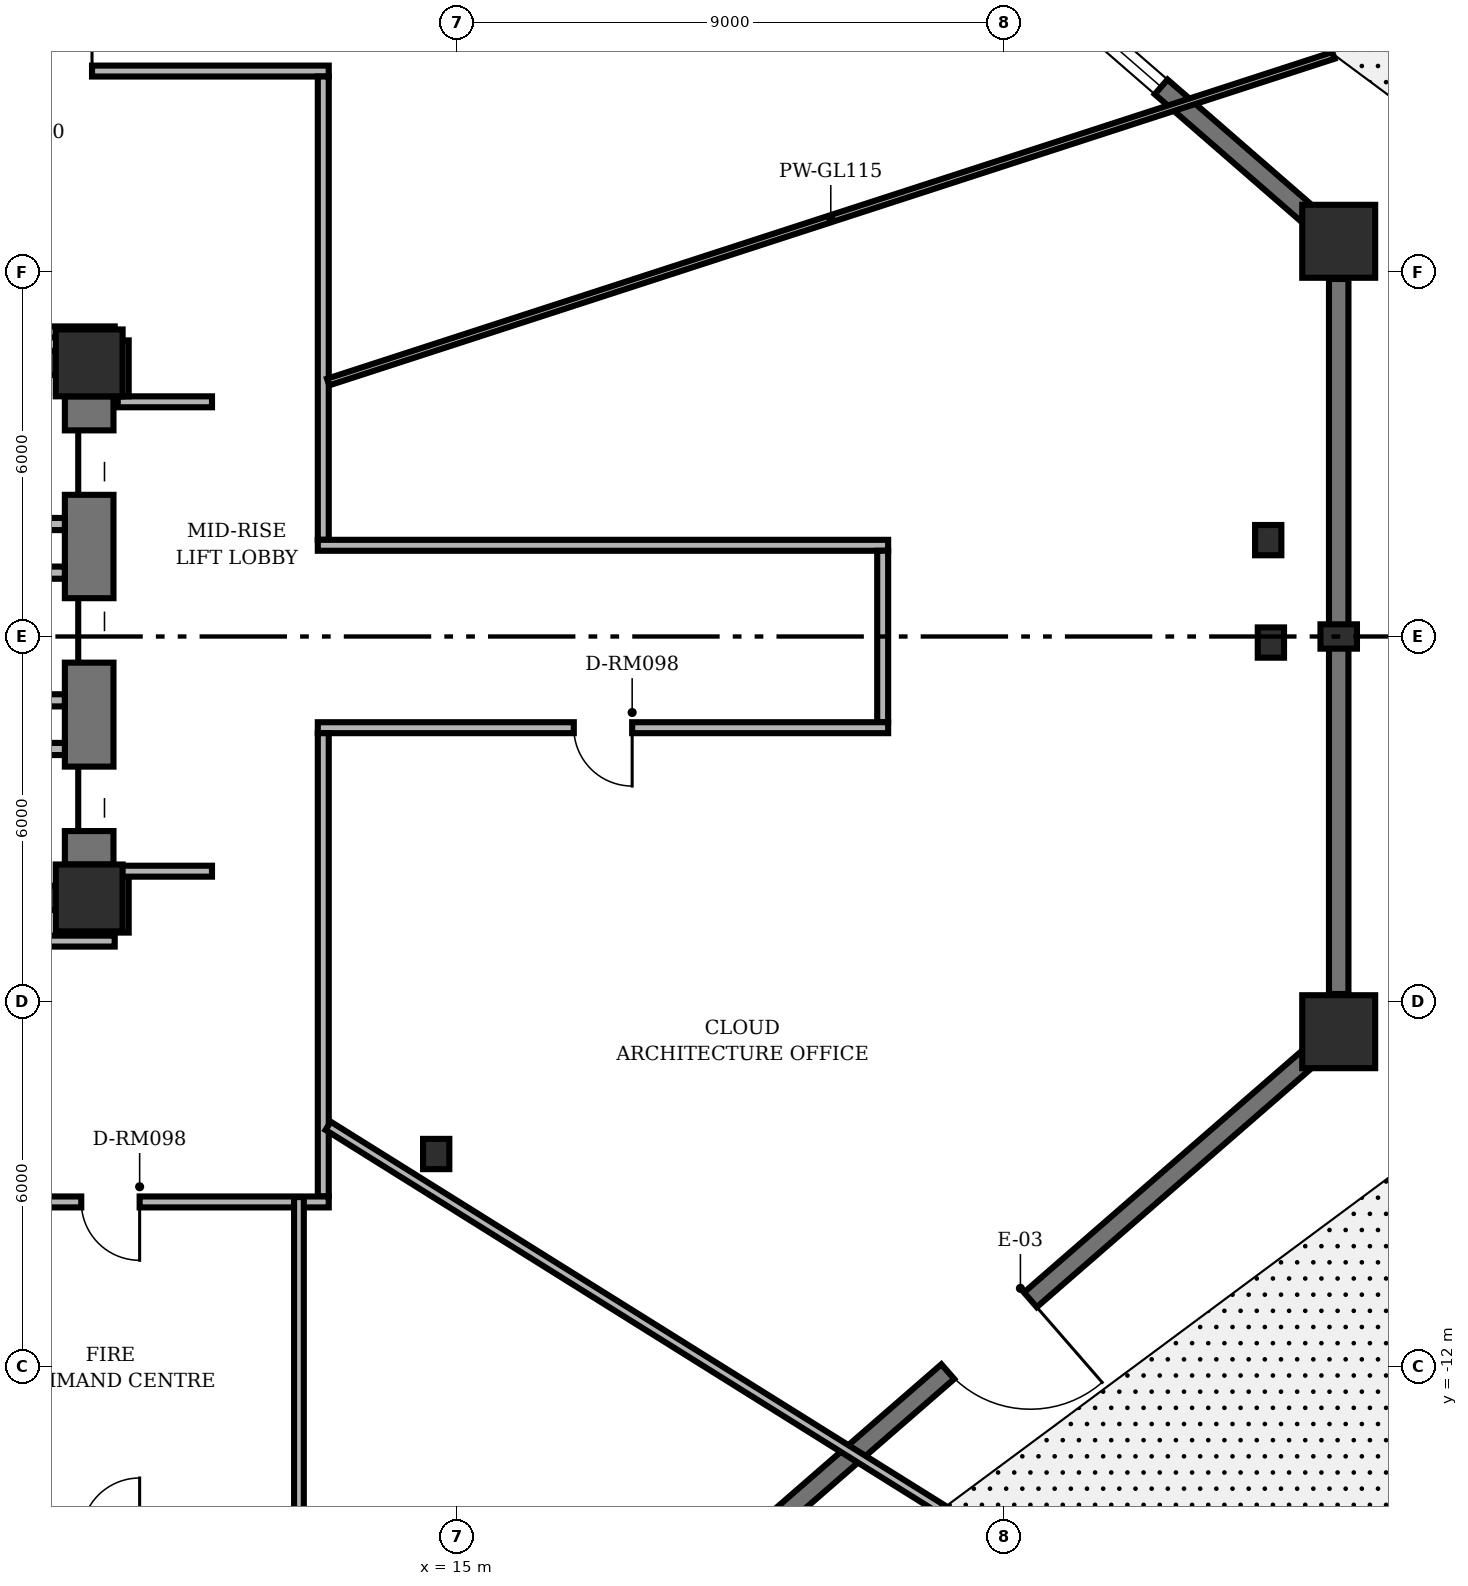
"""IFC4 building model, lengths in metres.
Left out: names, types, materials, properties, quantities, classifications, styles, units other than length and angle.
Written with IfcOpenShell. Run it as: python <this file> out.ifc"""

import sys

from ifc_helpers import new_model, si_unit, direction, frame, frame_2d, origin, origin_2d, place, context, subcontext, project, spatial, rectangle, hollow_rectangle, i_section, extrude, element, fill, save


model = new_model("IFC4")
c1 = context("Model", 3, precision=1e-05, world=origin(), true_north=direction((0.0, 1.0)))
c2 = subcontext(c1, "Body", "Model", "MODEL_VIEW")
j1 = project(units=[si_unit("LENGTHUNIT", "METRE"), si_unit("PLANEANGLEUNIT", "RADIAN")], contexts=[c1])
p1 = place(None, origin())
s1 = spatial("IfcSite", under=j1, at=p1, CompositionType="ELEMENT")
p2 = place(p1, origin())
s2 = spatial("IfcBuilding", under=s1, at=p2, CompositionType="ELEMENT")
p3 = place(p2, origin())
s3 = spatial("IfcBuildingStorey", under=s2, at=p3, CompositionType="ELEMENT", Elevation=0.0)
for number, where, z_axis, x_axis in (
    (1, (8.95, 4.5, 0.0), (0.0, 0.0, 1.0), (1.0, 0.0, 0.0)),
    (2, (8.95, -4.3, 0.0), (0.0, 0.0, 1.0), (1.0, 0.0, 0.0)),
):
    element("IfcColumn", number, at=place(p3, frame(where, z_axis=z_axis, x_axis=x_axis)), inside=s3, PredefinedType="COLUMN", context=c2, shape_type="SweptSolid", body=[
        extrude(hollow_rectangle(XDim=1.1, YDim=1.1, WallThickness=0.07, InnerFilletRadius=0.02, OuterFilletRadius=0.04, at=origin_2d()), origin(), (0.0, 0.0, 1.0), 4.8),
    ])
p4 = place(p3, frame((8.95, -3.75, 0.0), z_axis=(0.0, 0.0, 1.0), x_axis=(0.0, 1.0, 0.0)))
e3 = element("IfcWall", 3, at=p4, inside=s3, PredefinedType="SHEAR", context=c2, shape_type="SweptSolid", body=[
    extrude(rectangle(XDim=7.7, YDim=0.8, at=frame_2d((3.85, 0.0))), origin(), (0.0, 0.0, 1.0), 4.498),
])
p5 = place(p4, frame((0.55, 0.0, 0.0)))
e4 = element("IfcOpeningElement", 4, at=p5, cuts=e3, PredefinedType="OPENING", context=c2, shape_type="SweptSolid", body=[
    extrude(rectangle(XDim=1.06, YDim=2.04, at=frame_2d((0.53, 1.02))), frame((0.0, 0.41, 0.0), z_axis=(0.0, -1.0, 0.0), x_axis=(1.0, 0.0, 0.0)), (0.0, 0.0, 1.0), 0.82),
])
p6 = place(p4, frame((3.32, 0.0, 0.0)))
e5 = element("IfcOpeningElement", 5, at=p6, cuts=e3, PredefinedType="OPENING", context=c2, shape_type="SweptSolid", body=[
    extrude(rectangle(XDim=1.06, YDim=2.04, at=frame_2d((0.53, 1.02))), frame((0.0, 0.41, 0.0), z_axis=(0.0, -1.0, 0.0), x_axis=(1.0, 0.0, 0.0)), (0.0, 0.0, 1.0), 0.82),
])
p7 = place(p4, frame((6.08, 0.0, 0.0)))
e6 = element("IfcOpeningElement", 6, at=p7, cuts=e3, PredefinedType="OPENING", context=c2, shape_type="SweptSolid", body=[
    extrude(rectangle(XDim=1.06, YDim=2.04, at=frame_2d((0.53, 1.02))), frame((0.0, 0.41, 0.0), z_axis=(0.0, -1.0, 0.0), x_axis=(1.0, 0.0, 0.0)), (0.0, 0.0, 1.0), 0.82),
])
for number, where, z_axis, x_axis in (
    (7, (6.6, 4.5, 0.0), (0.0, 0.0, 1.0), (1.0, 0.0, 0.0)),
    (8, (6.6, -4.3, 0.0), (0.0, 0.0, 1.0), (1.0, 0.0, 0.0)),
):
    element("IfcWall", number, at=place(p3, frame(where, z_axis=z_axis, x_axis=x_axis)), inside=s3, PredefinedType="SHEAR", context=c2, shape_type="SweptSolid", body=[
        extrude(rectangle(XDim=1.8, YDim=0.4, at=frame_2d((0.9, 0.0))), origin(), (0.0, 0.0, 1.0), 4.498),
    ])
for number, where, z_axis, x_axis in (
    (9, (29.5, -6.5, 0.0), (0.0, 0.0, 1.0), (1.0, 0.0, 0.0)),
    (10, (29.5, 6.5, 0.0), (0.0, 0.0, 1.0), (1.0, 0.0, 0.0)),
):
    element("IfcColumn", number, at=place(p3, frame(where, z_axis=z_axis, x_axis=x_axis)), inside=s3, PredefinedType="COLUMN", context=c2, shape_type="SweptSolid", body=[
        extrude(rectangle(XDim=1.2, YDim=1.2, at=origin_2d()), origin(), (0.0, 0.0, 1.0), 4.8),
    ])
for number, where, z_axis, x_axis in (
    (11, (28.341, 1.585, 0.0), (0.0, 0.0, 1.0), (1.0, 0.0, 0.0)),
    (12, (14.657, -8.512, 0.0), (0.0, 0.0, 1.0), (1.0, 0.0, 0.0)),
    (13, (28.385, -0.1, 0.0), (0.0, 0.0, 1.0), (1.0, 0.0, 0.0)),
):
    element("IfcColumn", number, at=place(p3, frame(where, z_axis=z_axis, x_axis=x_axis)), inside=s3, PredefinedType="COLUMN", context=c2, shape_type="SweptSolid", body=[
        extrude(i_section(OverallWidth=0.432, OverallDepth=0.498, WebThickness=0.056, FlangeThickness=0.089, FilletRadius=0.025, at=origin_2d()), origin(), (0.0, 0.0, 1.0), 4.8),
    ])
p8 = place(p3, frame((29.5, 0.0, 0.0), z_axis=(0.0, 0.0, 1.0), x_axis=(1.0, 0.0, 0.0)))
e14 = element("IfcColumn", 14, at=p8, inside=s3, PredefinedType="PILASTER", context=c2, shape_type="SweptSolid", body=[
    extrude(rectangle(XDim=0.6, YDim=0.4, at=origin_2d()), origin(), (0.0, 0.0, 1.0), 4.8),
])
p9 = place(p3, frame((29.032, -6.907, 0.0), z_axis=(0.0, 0.0, 1.0), x_axis=(-0.754589002666, -0.656197711863, 0.0)))
e15 = element("IfcWall", 15, at=p9, inside=s3, PredefinedType="SOLIDWALL", context=c2, shape_type="SweptSolid", body=[
    extrude(rectangle(XDim=14.0, YDim=0.32, at=frame_2d((7.0, 0.0))), origin(), (0.0, 0.0, 1.0), 3.868),
])
p10 = place(p9, frame((6.1, 0.0, 0.0)))
e16 = element("IfcOpeningElement", 16, at=p10, cuts=e15, PredefinedType="OPENING", context=c2, shape_type="SweptSolid", body=[
    extrude(rectangle(XDim=1.8, YDim=2.3, at=frame_2d((0.9, 1.15))), frame((0.0, 0.17, 0.0), z_axis=(0.0, -1.0, 0.0), x_axis=(1.0, 0.0, 0.0)), (0.0, 0.0, 1.0), 0.34),
])
p11 = place(p3, frame((29.5, 5.88, 0.0), z_axis=(0.0, 0.0, 1.0), x_axis=(0.0, -1.0, 0.0)))
e17 = element("IfcWall", 17, at=p11, inside=s3, PredefinedType="SOLIDWALL", context=c2, shape_type="SweptSolid", body=[
    extrude(rectangle(XDim=11.76, YDim=0.32, at=frame_2d((5.88, 0.0))), origin(), (0.0, 0.0, 1.0), 3.868),
])
p12 = place(p3, frame((18.468, 16.093, 0.0), z_axis=(0.0, 0.0, 1.0), x_axis=(0.754589002666, -0.656197711863, 0.0)))
e18 = element("IfcWall", 18, at=p12, inside=s3, PredefinedType="SOLIDWALL", context=c2, shape_type="SweptSolid", body=[
    extrude(rectangle(XDim=14.0, YDim=0.32, at=frame_2d((7.0, 0.0))), origin(), (0.0, 0.0, 1.0), 3.868),
])
p13 = place(p12, frame((3.25, 0.0, 0.65)))
e19 = element("IfcOpeningElement", 19, at=p13, cuts=e18, PredefinedType="OPENING", context=c2, shape_type="SweptSolid", body=[
    extrude(rectangle(XDim=1.7, YDim=1.5, at=frame_2d((0.85, 0.75))), frame((0.0, 0.17, 0.0), z_axis=(0.0, -1.0, 0.0), x_axis=(1.0, 0.0, 0.0)), (0.0, 0.0, 1.0), 0.34),
])
p14 = place(p12, frame((9.05, 0.0, 0.65)))
e20 = element("IfcOpeningElement", 20, at=p14, cuts=e18, PredefinedType="OPENING", context=c2, shape_type="SweptSolid", body=[
    extrude(rectangle(XDim=1.7, YDim=1.5, at=frame_2d((0.85, 0.75))), frame((0.0, 0.17, 0.0), z_axis=(0.0, -1.0, 0.0), x_axis=(1.0, 0.0, 0.0)), (0.0, 0.0, 1.0), 0.34),
])
for number, where, z_axis, x_axis in (
    (21, (6.45, -1.85, 0.0), (0.0, 0.0, 1.0), (1.0, 0.0, 0.0)),
    (22, (6.45, 1.85, 0.0), (0.0, 0.0, 1.0), (1.0, 0.0, 0.0)),
):
    element("IfcWall", number, at=place(p3, frame(where, z_axis=z_axis, x_axis=x_axis)), inside=s3, PredefinedType="PARTITIONING", context=c2, shape_type="SweptSolid", body=[
        extrude(rectangle(XDim=2.1, YDim=0.2, at=frame_2d((1.05, 0.0))), origin(), (0.0, 0.0, 1.0), 4.473),
    ])
for number, where, z_axis, x_axis in (
    (23, (6.64, -1.05, 0.0), (0.0, 0.0, 1.0), (1.0, 0.0, 0.0)),
    (24, (6.64, 1.05, 0.0), (0.0, 0.0, 1.0), (1.0, 0.0, 0.0)),
):
    element("IfcWall", number, at=place(p3, frame(where, z_axis=z_axis, x_axis=x_axis)), inside=s3, PredefinedType="PARTITIONING", context=c2, shape_type="SweptSolid", body=[
        extrude(rectangle(XDim=1.91, YDim=0.2, at=frame_2d((0.955, 0.0))), origin(), (0.0, 0.0, 1.0), 4.473),
    ])
p15 = place(p3, frame((2.31, 9.3, 0.0), z_axis=(0.0, 0.0, 1.0), x_axis=(1.0, 0.0, 0.0)))
e25 = element("IfcWall", 25, at=p15, inside=s3, PredefinedType="PARTITIONING", context=c2, shape_type="SweptSolid", body=[
    extrude(rectangle(XDim=10.58, YDim=0.18, at=frame_2d((5.29, 0.0))), origin(), (0.0, 0.0, 1.0), 3.987),
])
p16 = place(p15, frame((5.507, 0.0, 0.0)))
e26 = element("IfcOpeningElement", 26, at=p16, cuts=e25, PredefinedType="OPENING", context=c2, shape_type="SweptSolid", body=[
    extrude(rectangle(XDim=1.18, YDim=2.02, at=frame_2d((0.59, 1.01))), frame((0.0, 0.1, 0.0), z_axis=(0.0, -1.0, 0.0), x_axis=(1.0, 0.0, 0.0)), (0.0, 0.0, 1.0), 0.2),
])
p17 = place(p3, frame((12.8, 9.21, 0.0), z_axis=(0.0, 0.0, 1.0), x_axis=(0.0, -1.0, 0.0)))
e27 = element("IfcWall", 27, at=p17, inside=s3, PredefinedType="PARTITIONING", context=c2, shape_type="SweptSolid", body=[
    extrude(rectangle(XDim=7.62, YDim=0.18, at=frame_2d((3.81, 0.0))), origin(), (0.0, 0.0, 1.0), 4.473),
])
p18 = place(p3, frame((12.71, 1.5, 0.0), z_axis=(0.0, 0.0, 1.0), x_axis=(1.0, 0.0, 0.0)))
e28 = element("IfcWall", 28, at=p18, inside=s3, PredefinedType="PARTITIONING", context=c2, shape_type="SweptSolid", body=[
    extrude(rectangle(XDim=9.38, YDim=0.18, at=frame_2d((4.69, 0.0))), origin(), (0.0, 0.0, 1.0), 4.473),
])
p19 = place(p3, frame((22.0, 1.41, 0.0), z_axis=(0.0, 0.0, 1.0), x_axis=(0.0, -1.0, 0.0)))
e29 = element("IfcWall", 29, at=p19, inside=s3, PredefinedType="PARTITIONING", context=c2, shape_type="SweptSolid", body=[
    extrude(rectangle(XDim=2.82, YDim=0.18, at=frame_2d((1.41, 0.0))), origin(), (0.0, 0.0, 1.0), 4.473),
])
p20 = place(p3, frame((22.09, -1.5, 0.0), z_axis=(0.0, 0.0, 1.0), x_axis=(-1.0, 0.0, 0.0)))
e30 = element("IfcWall", 30, at=p20, inside=s3, PredefinedType="PARTITIONING", context=c2, shape_type="SweptSolid", body=[
    extrude(rectangle(XDim=9.38, YDim=0.18, at=frame_2d((4.69, 0.0))), origin(), (0.0, 0.0, 1.0), 4.473),
])
p21 = place(p20, frame((4.21, 0.0, 0.0)))
e31 = element("IfcOpeningElement", 31, at=p21, cuts=e30, PredefinedType="OPENING", context=c2, shape_type="SweptSolid", body=[
    extrude(rectangle(XDim=0.96, YDim=2.02, at=frame_2d((0.48, 1.01))), frame((0.0, 0.1, 0.0), z_axis=(0.0, -1.0, 0.0), x_axis=(1.0, 0.0, 0.0)), (0.0, 0.0, 1.0), 0.2),
])
p22 = place(p3, frame((12.8, -1.59, 0.0), z_axis=(0.0, 0.0, 1.0), x_axis=(0.0, -1.0, 0.0)))
e32 = element("IfcWall", 32, at=p22, inside=s3, PredefinedType="PARTITIONING", context=c2, shape_type="SweptSolid", body=[
    extrude(rectangle(XDim=7.62, YDim=0.18, at=frame_2d((3.81, 0.0))), origin(), (0.0, 0.0, 1.0), 4.473),
])
p23 = place(p3, frame((12.89, -9.3, 0.0), z_axis=(0.0, 0.0, 1.0), x_axis=(-1.0, 0.0, 0.0)))
e33 = element("IfcWall", 33, at=p23, inside=s3, PredefinedType="PARTITIONING", context=c2, shape_type="SweptSolid", body=[
    extrude(rectangle(XDim=8.44, YDim=0.18, at=frame_2d((4.22, 0.0))), origin(), (0.0, 0.0, 1.0), 3.987),
])
p24 = place(p23, frame((3.11, 0.0, 0.0)))
e34 = element("IfcOpeningElement", 34, at=p24, cuts=e33, PredefinedType="OPENING", context=c2, shape_type="SweptSolid", body=[
    extrude(rectangle(XDim=0.96, YDim=2.02, at=frame_2d((0.48, 1.01))), frame((0.0, 0.1, 0.0), z_axis=(0.0, -1.0, 0.0), x_axis=(1.0, 0.0, 0.0)), (0.0, 0.0, 1.0), 0.2),
])
p25 = place(p3, frame((6.03, -5.01, 0.0), z_axis=(0.0, 0.0, 1.0), x_axis=(1.0, 0.0, 0.0)))
e35 = element("IfcWall", 35, at=p25, inside=s3, PredefinedType="PARTITIONING", context=c2, shape_type="SweptSolid", body=[
    extrude(rectangle(XDim=3.34, YDim=0.18, at=frame_2d((1.67, 0.0))), origin(), (0.0, 0.0, 1.0), 4.473),
])
p26 = place(p3, frame((9.51, -4.87, 0.0), z_axis=(0.0, 0.0, 1.0), x_axis=(0.0, 1.0, 0.0)))
e36 = element("IfcWall", 36, at=p26, inside=s3, PredefinedType="PARTITIONING", context=c2, shape_type="SweptSolid", body=[
    extrude(rectangle(XDim=0.92, YDim=0.18, at=frame_2d((0.46, 0.0))), origin(), (0.0, 0.0, 1.0), 4.473),
])
for number, where, z_axis, x_axis in (
    (37, (9.42, -3.86, 0.0), (0.0, 0.0, 1.0), (1.0, 0.0, 0.0)),
    (38, (10.97, 3.86, 0.0), (0.0, 0.0, 1.0), (-1.0, 0.0, 0.0)),
):
    element("IfcWall", number, at=place(p3, frame(where, z_axis=z_axis, x_axis=x_axis)), inside=s3, PredefinedType="PARTITIONING", context=c2, shape_type="SweptSolid", body=[
        extrude(rectangle(XDim=1.55, YDim=0.18, at=frame_2d((0.775, 0.0))), origin(), (0.0, 0.0, 1.0), 4.473),
    ])
p27 = place(p3, frame((9.51, 3.95, 0.0), z_axis=(0.0, 0.0, 1.0), x_axis=(0.0, 1.0, 0.0)))
e39 = element("IfcWall", 39, at=p27, inside=s3, PredefinedType="PARTITIONING", context=c2, shape_type="SweptSolid", body=[
    extrude(rectangle(XDim=0.92, YDim=0.18, at=frame_2d((0.46, 0.0))), origin(), (0.0, 0.0, 1.0), 4.473),
])
p28 = place(p3, frame((9.37, 5.01, 0.0), z_axis=(0.0, 0.0, 1.0), x_axis=(-1.0, 0.0, 0.0)))
e40 = element("IfcWall", 40, at=p28, inside=s3, PredefinedType="PARTITIONING", context=c2, shape_type="SweptSolid", body=[
    extrude(rectangle(XDim=2.808, YDim=0.18, at=frame_2d((1.404, 0.0))), origin(), (0.0, 0.0, 1.0), 4.473),
])
p29 = place(p3, frame((12.88, -8.048, 0.0), z_axis=(0.0, 0.0, 1.0), x_axis=(0.848053688019, -0.529910315278, 0.0)))
e41 = element("IfcWall", 41, at=p29, inside=s3, PredefinedType="PARTITIONING", context=c2, shape_type="SweptSolid", body=[
    extrude(rectangle(XDim=11.886, YDim=0.16, at=frame_2d((5.943, 0.0))), origin(), (0.0, 0.0, 1.0), 4.473),
])
p30 = place(p3, frame((12.88, 4.185, 0.0), z_axis=(0.0, 0.0, 1.0), x_axis=(0.951056153028, 0.309018112394, 0.0)))
e42 = element("IfcWall", 42, at=p30, inside=s3, PredefinedType="MOVABLE", context=c2, shape_type="SweptSolid", body=[
    extrude(rectangle(XDim=17.384, YDim=0.115, at=frame_2d((8.692, 0.0))), origin(), (0.0, 0.0, 1.0), 3.598),
])
p31 = place(p3, frame((4.176, 9.38, 0.0), z_axis=(0.0, 0.0, 1.0), x_axis=(0.406726574704, 0.913549940304, 0.0)))
e43 = element("IfcWall", 43, at=p31, inside=s3, PredefinedType="PARTITIONING", context=c2, shape_type="SweptSolid", body=[
    extrude(rectangle(XDim=15.559, YDim=0.24, at=frame_2d((7.779, 0.0))), origin(), (0.0, 0.0, 1.0), 4.473),
])
p32 = place(p3, frame((12.4, -14.8, 0.0), z_axis=(0.0, 0.0, 1.0), x_axis=(0.0, 1.0, 0.0)))
e44 = element("IfcWall", 44, at=p32, inside=s3, PredefinedType="PARTITIONING", context=c2, shape_type="SweptSolid", body=[
    extrude(rectangle(XDim=5.58, YDim=0.16, at=frame_2d((2.79, 0.0))), origin(), (0.0, 0.0, 1.0), 4.473),
])
p33 = place(p10, origin())
e45 = element("IfcDoor", 45, at=p33, inside=s3, OperationType="SINGLE_SWING_LEFT", PredefinedType="DOOR", context=c2, shape_type="SweptSolid", body=[
    extrude(rectangle(XDim=1.8, YDim=2.3, at=frame_2d((0.9, 1.15))), frame((0.0, 0.025, 0.0), z_axis=(0.0, -1.0, 0.0), x_axis=(1.0, 0.0, 0.0)), (0.0, 0.0, 1.0), 0.05),
])
fill(e16, e45)
p34 = place(p14, origin())
e46 = element("IfcWindow", 46, at=p34, inside=s3, PartitioningType="SINGLE_PANEL", PredefinedType="WINDOW", context=c2, shape_type="SweptSolid", body=[
    extrude(rectangle(XDim=1.7, YDim=1.5, at=frame_2d((0.85, 0.75))), frame((0.0, 0.03, 0.0), z_axis=(0.0, -1.0, 0.0), x_axis=(1.0, 0.0, 0.0)), (0.0, 0.0, 1.0), 0.06),
])
fill(e20, e46)
p35 = place(p5, origin())
e47 = element("IfcDoor", 47, at=p35, inside=s3, OperationType="SLIDING_TO_LEFT", PredefinedType="DOOR", context=c2, shape_type="SweptSolid", body=[
    extrude(rectangle(XDim=1.06, YDim=2.04, at=frame_2d((0.53, 1.02))), frame((0.0, 0.025, 0.0), z_axis=(0.0, -1.0, 0.0), x_axis=(1.0, 0.0, 0.0)), (0.0, 0.0, 1.0), 0.05),
])
fill(e4, e47)
p36 = place(p6, origin())
e48 = element("IfcDoor", 48, at=p36, inside=s3, OperationType="SLIDING_TO_RIGHT", PredefinedType="DOOR", context=c2, shape_type="SweptSolid", body=[
    extrude(rectangle(XDim=1.06, YDim=2.04, at=frame_2d((0.53, 1.02))), frame((0.0, 0.025, 0.0), z_axis=(0.0, -1.0, 0.0), x_axis=(1.0, 0.0, 0.0)), (0.0, 0.0, 1.0), 0.05),
])
fill(e5, e48)
p37 = place(p7, origin())
e49 = element("IfcDoor", 49, at=p37, inside=s3, OperationType="SLIDING_TO_LEFT", PredefinedType="DOOR", context=c2, shape_type="SweptSolid", body=[
    extrude(rectangle(XDim=1.06, YDim=2.04, at=frame_2d((0.53, 1.02))), frame((0.0, 0.025, 0.0), z_axis=(0.0, -1.0, 0.0), x_axis=(1.0, 0.0, 0.0)), (0.0, 0.0, 1.0), 0.05),
])
fill(e6, e49)
p38 = place(p24, origin())
e50 = element("IfcDoor", 50, at=p38, inside=s3, OperationType="SINGLE_SWING_LEFT", PredefinedType="DOOR", context=c2, shape_type="SweptSolid", body=[
    extrude(rectangle(XDim=0.96, YDim=2.02, at=frame_2d((0.48, 1.01))), frame((0.0, 0.025, 0.0), z_axis=(0.0, -1.0, 0.0), x_axis=(1.0, 0.0, 0.0)), (0.0, 0.0, 1.0), 0.05),
])
fill(e34, e50)
p39 = place(p21, origin())
e51 = element("IfcDoor", 51, at=p39, inside=s3, OperationType="SINGLE_SWING_LEFT", PredefinedType="DOOR", context=c2, shape_type="SweptSolid", body=[
    extrude(rectangle(XDim=0.96, YDim=2.02, at=frame_2d((0.48, 1.01))), frame((0.0, 0.025, 0.0), z_axis=(0.0, -1.0, 0.0), x_axis=(1.0, 0.0, 0.0)), (0.0, 0.0, 1.0), 0.05),
])
fill(e31, e51)
p40 = place(p16, origin())
e52 = element("IfcDoor", 52, at=p40, inside=s3, OperationType="SINGLE_SWING_RIGHT", PredefinedType="DOOR", context=c2, shape_type="SweptSolid", body=[
    extrude(rectangle(XDim=1.18, YDim=2.02, at=frame_2d((0.59, 1.01))), frame((0.0, 0.025, 0.0), z_axis=(0.0, -1.0, 0.0), x_axis=(1.0, 0.0, 0.0)), (0.0, 0.0, 1.0), 0.05),
])
fill(e26, e52)
save(model, sys.argv[1])
